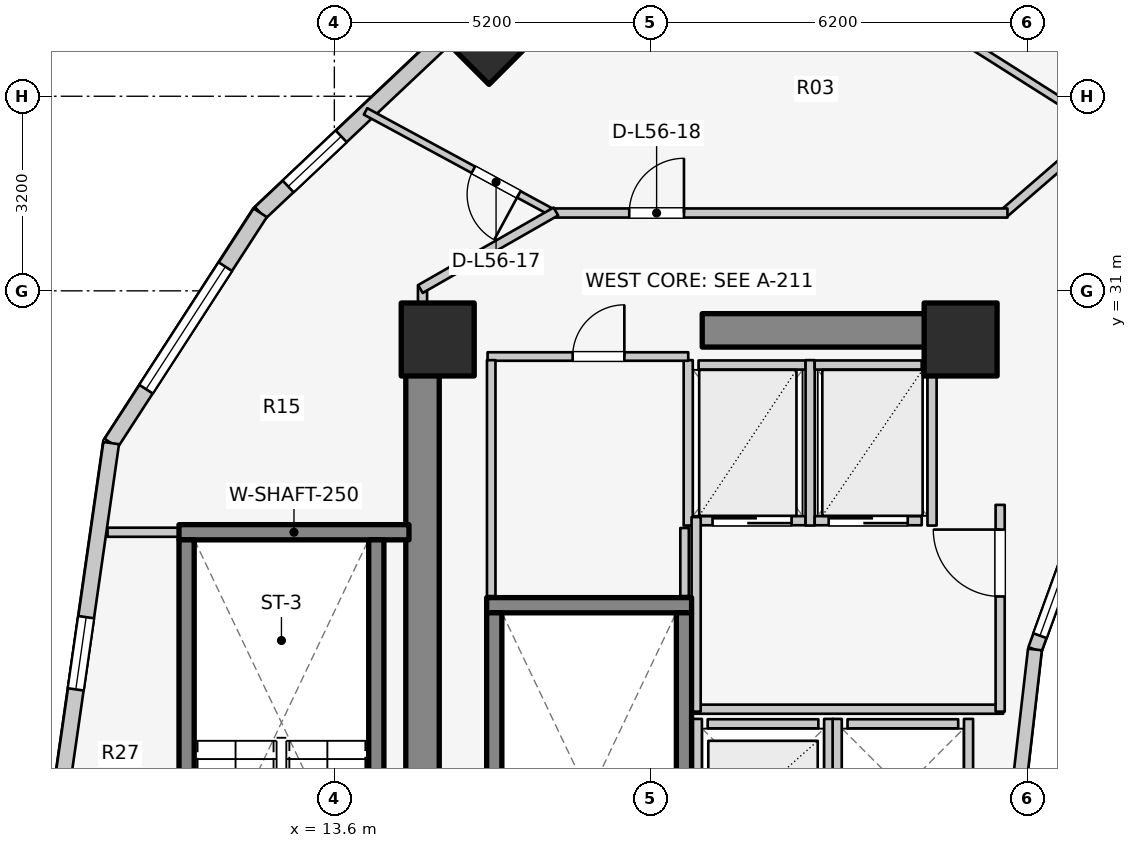
"""IFC4 building model, lengths in metres.
Left out: names, types, materials, properties, quantities, classifications, styles, units other than length and angle.
Written with IfcOpenShell. Run it as: python <this file> out.ifc"""

import sys

from ifc_helpers import new_model, si_unit, direction, frame, frame_2d, origin, origin_2d, place, context, subcontext, project, spatial, rectangle, extrude, element, fill, save


model = new_model("IFC4")
c1 = context("Model", 3, precision=1e-05, world=origin(), true_north=direction((0.0, 1.0)))
c2 = subcontext(c1, "Body", "Model", "MODEL_VIEW")
j1 = project(units=[si_unit("LENGTHUNIT", "METRE"), si_unit("PLANEANGLEUNIT", "RADIAN")], contexts=[c1])
p1 = place(None, origin())
s1 = spatial("IfcSite", under=j1, at=p1, CompositionType="ELEMENT")
p2 = place(p1, origin())
s2 = spatial("IfcBuilding", under=s1, at=p2, CompositionType="ELEMENT")
p3 = place(p2, frame((0.0, 0.0, 183.9)))
s3 = spatial("IfcBuildingStorey", under=s2, at=p3, CompositionType="ELEMENT", Elevation=183.9)
p4 = place(p3, frame((15.05, 17.05, 0.0), z_axis=(0.0, 0.0, 1.0), x_axis=(0.0, 1.0, 0.0)))
e1 = element("IfcWall", 1, at=p4, inside=s3, PredefinedType="SHEAR", context=c2, shape_type="SweptSolid", body=[
    extrude(rectangle(XDim=12.8, YDim=0.55, at=frame_2d((6.4, 0.0))), origin(), (0.0, 0.0, 1.0), 3.1),
])
p5 = place(p3, frame((19.65, 30.35, 0.0), z_axis=(0.0, 0.0, 1.0), x_axis=(1.0, 0.0, 0.0)))
e2 = element("IfcWall", 2, at=p5, inside=s3, PredefinedType="SHEAR", context=c2, shape_type="SweptSolid", body=[
    extrude(rectangle(XDim=4.5, YDim=0.55, at=frame_2d((2.25, 0.0))), origin(), (0.0, 0.0, 1.0), 3.1),
])
p6 = place(p3, frame((16.105, 25.83, 0.0), z_axis=(0.0, 0.0, 1.0), x_axis=(1.0, 0.0, 0.0)))
e3 = element("IfcWall", 3, at=p6, inside=s3, PredefinedType="SOLIDWALL", context=c2, shape_type="SweptSolid", body=[
    extrude(rectangle(XDim=3.37, YDim=0.25, at=frame_2d((1.685, 0.0))), origin(), (0.0, 0.0, 1.0), 3.1),
])
for number, where, z_axis, x_axis in (
    (4, (16.23, 17.895, 0.0), (0.0, 0.0, 1.0), (0.0, 1.0, 0.0)),
    (5, (19.35, 17.895, 0.0), (0.0, 0.0, 1.0), (0.0, 1.0, 0.0)),
):
    element("IfcWall", number, at=place(p3, frame(where, z_axis=z_axis, x_axis=x_axis)), inside=s3, PredefinedType="SOLIDWALL", context=c2, shape_type="SweptSolid", body=[
        extrude(rectangle(XDim=7.81, YDim=0.25, at=frame_2d((3.905, 0.0))), origin(), (0.0, 0.0, 1.0), 3.1),
    ])
p7 = place(p3, frame((11.045, 27.03, 0.0), z_axis=(0.0, 0.0, 1.0), x_axis=(1.0, 0.0, 0.0)))
e6 = element("IfcWall", 6, at=p7, inside=s3, PredefinedType="SOLIDWALL", context=c2, shape_type="SweptSolid", body=[
    extrude(rectangle(XDim=3.782, YDim=0.25, at=frame_2d((1.891, 0.0))), origin(), (0.0, 0.0, 1.0), 3.1),
])
for number, where, z_axis, x_axis in (
    (7, (11.17, 19.095, 0.0), (0.0, 0.0, 1.0), (0.0, 1.0, 0.0)),
    (8, (14.29, 19.095, 0.0), (0.0, 0.0, 1.0), (0.0, 1.0, 0.0)),
):
    element("IfcWall", number, at=place(p3, frame(where, z_axis=z_axis, x_axis=x_axis)), inside=s3, PredefinedType="SOLIDWALL", context=c2, shape_type="SweptSolid", body=[
        extrude(rectangle(XDim=7.81, YDim=0.25, at=frame_2d((3.905, 0.0))), origin(), (0.0, 0.0, 1.0), 3.1),
    ])
for number, where, z_axis, x_axis in (
    (9, (23.9, 30.2, 0.0), (0.0, 0.0, 1.0), (1.0, 0.0, 0.0)),
    (10, (15.3, 30.2, 0.0), (0.0, 0.0, 1.0), (1.0, 0.0, 0.0)),
):
    element("IfcColumn", number, at=place(p3, frame(where, z_axis=z_axis, x_axis=x_axis)), inside=s3, PredefinedType="COLUMN", context=c2, shape_type="SweptSolid", body=[
        extrude(rectangle(XDim=1.2, YDim=1.2, at=origin_2d()), origin(), (0.0, 0.0, 1.0), 3.1),
    ])
p8 = place(p3, frame((16.143, 35.031, 0.0), z_axis=(0.0, 0.0, 1.0), x_axis=(-0.707106781187, 0.707106781187, 0.0)))
e11 = element("IfcColumn", 11, at=p8, inside=s3, PredefinedType="COLUMN", context=c2, shape_type="SweptSolid", body=[
    extrude(rectangle(XDim=0.9, YDim=0.9, at=origin_2d()), origin(), (0.0, 0.0, 1.0), 3.1),
])
p9 = place(p3, frame((25.834, 27.06, 0.0), z_axis=(0.0, 0.0, 1.0), x_axis=(-0.341423187295, -0.93990968033, 0.0)))
e12 = element("IfcWall", 12, at=p9, inside=s3, PredefinedType="STANDARD", context=c2, shape_type="SweptSolid", body=[
    extrude(rectangle(XDim=2.084, YDim=0.23, at=frame_2d((1.042, 0.0))), origin(), (0.0, 0.0, 1.0), 2.84),
])
p10 = place(p9, frame((0.242, 0.0, 0.85)))
e13 = element("IfcOpeningElement", 13, at=p10, cuts=e12, PredefinedType="OPENING", context=c2, shape_type="SweptSolid", body=[
    extrude(rectangle(XDim=1.6, YDim=1.65, at=frame_2d((0.8, 0.825))), frame((0.0, 0.125, 0.0), z_axis=(0.0, -1.0, 0.0), x_axis=(1.0, 0.0, 0.0)), (0.0, 0.0, 1.0), 0.25),
])
p11 = place(p3, frame((25.123, 25.102, 0.0), z_axis=(0.0, 0.0, 1.0), x_axis=(-0.114711713601, -0.993398823617, 0.0)))
e14 = element("IfcWall", 14, at=p11, inside=s3, PredefinedType="STANDARD", context=c2, shape_type="SweptSolid", body=[
    extrude(rectangle(XDim=2.115, YDim=0.23, at=frame_2d((1.058, 0.0))), origin(), (0.0, 0.0, 1.0), 2.84),
])
p12 = place(p3, frame((15.731, 35.441, 0.0), z_axis=(0.0, 0.0, 1.0), x_axis=(-0.727667301037, -0.68593024354, 0.0)))
e15 = element("IfcWall", 15, at=p12, inside=s3, PredefinedType="STANDARD", context=c2, shape_type="SweptSolid", body=[
    extrude(rectangle(XDim=4.604, YDim=0.26, at=frame_2d((2.302, 0.0))), origin(), (0.0, 0.0, 1.0), 2.85),
])
p13 = place(p12, frame((2.772, 0.0, 0.75)))
e16 = element("IfcOpeningElement", 16, at=p13, cuts=e15, PredefinedType="OPENING", context=c2, shape_type="SweptSolid", body=[
    extrude(rectangle(XDim=1.2, YDim=1.5, at=frame_2d((0.6, 0.75))), frame((0.0, 0.14, 0.0), z_axis=(0.0, -1.0, 0.0), x_axis=(1.0, 0.0, 0.0)), (0.0, 0.0, 1.0), 0.28),
])
p14 = place(p3, frame((12.381, 32.284, 0.0), z_axis=(0.0, 0.0, 1.0), x_axis=(-0.543358984534, -0.839500454989, 0.0)))
e17 = element("IfcWall", 17, at=p14, inside=s3, PredefinedType="STANDARD", context=c2, shape_type="SweptSolid", body=[
    extrude(rectangle(XDim=4.511, YDim=0.26, at=frame_2d((2.256, 0.0))), origin(), (0.0, 0.0, 1.0), 2.85),
])
p15 = place(p14, frame((1.056, 0.0, 0.75)))
e18 = element("IfcOpeningElement", 18, at=p15, cuts=e17, PredefinedType="OPENING", context=c2, shape_type="SweptSolid", body=[
    extrude(rectangle(XDim=2.4, YDim=1.7, at=frame_2d((1.2, 0.85))), frame((0.0, 0.14, 0.0), z_axis=(0.0, -1.0, 0.0), x_axis=(1.0, 0.0, 0.0)), (0.0, 0.0, 1.0), 0.28),
])
p16 = place(p3, frame((9.93, 28.497, 0.0), z_axis=(0.0, 0.0, 1.0), x_axis=(-0.142227632286, -0.989833976288, 0.0)))
e19 = element("IfcWall", 19, at=p16, inside=s3, PredefinedType="STANDARD", context=c2, shape_type="SweptSolid", body=[
    extrude(rectangle(XDim=5.553, YDim=0.26, at=frame_2d((2.776, 0.0))), origin(), (0.0, 0.0, 1.0), 2.85),
])
p17 = place(p16, frame((2.892, 0.0, 0.75)))
e20 = element("IfcOpeningElement", 20, at=p17, cuts=e19, PredefinedType="OPENING", context=c2, shape_type="SweptSolid", body=[
    extrude(rectangle(XDim=1.2, YDim=1.5, at=frame_2d((0.6, 0.75))), frame((0.0, 0.14, 0.0), z_axis=(0.0, -1.0, 0.0), x_axis=(1.0, 0.0, 0.0)), (0.0, 0.0, 1.0), 0.28),
])
p18 = place(p3, frame((19.74, 23.88, 0.0), z_axis=(0.0, 0.0, 1.0), x_axis=(1.0, 0.0, 0.0)))
e21 = element("IfcWall", 21, at=p18, inside=s3, PredefinedType="SOLIDWALL", context=c2, shape_type="SweptSolid", body=[
    extrude(rectangle(XDim=1.82, YDim=0.15, at=frame_2d((0.91, 0.0))), origin(), (0.0, 0.0, 1.0), 2.855),
])
for number, where, z_axis, x_axis in (
    (22, (19.57, 21.64, 0.0), (0.0, 0.0, 1.0), (0.0, 1.0, 0.0)),
    (23, (21.73, 21.64, 0.0), (0.0, 0.0, 1.0), (0.0, 1.0, 0.0)),
):
    element("IfcWall", number, at=place(p3, frame(where, z_axis=z_axis, x_axis=x_axis)), inside=s3, PredefinedType="SOLIDWALL", context=c2, shape_type="SweptSolid", body=[
        extrude(rectangle(XDim=2.32, YDim=0.15, at=frame_2d((1.16, 0.0))), origin(), (0.0, 0.0, 1.0), 2.855),
    ])
p19 = place(p3, frame((22.04, 23.88, 0.0), z_axis=(0.0, 0.0, 1.0), x_axis=(1.0, 0.0, 0.0)))
e24 = element("IfcWall", 24, at=p19, inside=s3, PredefinedType="SOLIDWALL", context=c2, shape_type="SweptSolid", body=[
    extrude(rectangle(XDim=1.82, YDim=0.15, at=frame_2d((0.91, 0.0))), origin(), (0.0, 0.0, 1.0), 2.12),
])
p20 = place(p3, frame((21.87, 21.64, 0.0), z_axis=(0.0, 0.0, 1.0), x_axis=(0.0, 1.0, 0.0)))
e25 = element("IfcWall", 25, at=p20, inside=s3, PredefinedType="SOLIDWALL", context=c2, shape_type="SweptSolid", body=[
    extrude(rectangle(XDim=2.32, YDim=0.15, at=frame_2d((1.16, 0.0))), origin(), (0.0, 0.0, 1.0), 2.855),
])
p21 = place(p3, frame((24.03, 21.64, 0.0), z_axis=(0.0, 0.0, 1.0), x_axis=(0.0, 1.0, 0.0)))
e26 = element("IfcWall", 26, at=p21, inside=s3, PredefinedType="SOLIDWALL", context=c2, shape_type="SweptSolid", body=[
    extrude(rectangle(XDim=2.32, YDim=0.15, at=frame_2d((1.16, 0.0))), origin(), (0.0, 0.0, 1.0), 2.12),
])
p22 = place(p3, frame((19.59, 27.22, 0.0), z_axis=(0.0, 0.0, 1.0), x_axis=(1.0, 0.0, 0.0)))
e27 = element("IfcWall", 27, at=p22, inside=s3, PredefinedType="SOLIDWALL", context=c2, shape_type="SweptSolid", body=[
    extrude(rectangle(XDim=1.76, YDim=0.15, at=frame_2d((0.88, 0.0))), origin(), (0.0, 0.0, 1.0), 2.855),
])
p23 = place(p22, frame((0.23, 0.0, 0.0)))
e28 = element("IfcOpeningElement", 28, at=p23, cuts=e27, PredefinedType="OPENING", context=c2, shape_type="SweptSolid", body=[
    extrude(rectangle(XDim=1.3, YDim=2.1, at=frame_2d((0.65, 1.05))), frame((0.0, 0.085, 0.0), z_axis=(0.0, -1.0, 0.0), x_axis=(1.0, 0.0, 0.0)), (0.0, 0.0, 1.0), 0.17),
])
p24 = place(p3, frame((19.59, 29.78, 0.0), z_axis=(0.0, 0.0, 1.0), x_axis=(1.0, 0.0, 0.0)))
e29 = element("IfcWall", 29, at=p24, inside=s3, PredefinedType="SOLIDWALL", context=c2, shape_type="SweptSolid", body=[
    extrude(rectangle(XDim=1.76, YDim=0.15, at=frame_2d((0.88, 0.0))), origin(), (0.0, 0.0, 1.0), 2.855),
])
for number, where, z_axis, x_axis in (
    (30, (19.42, 27.14, 0.0), (0.0, 0.0, 1.0), (0.0, 1.0, 0.0)),
    (31, (21.425, 27.14, 0.0), (0.0, 0.0, 1.0), (0.0, 1.0, 0.0)),
):
    element("IfcWall", number, at=place(p3, frame(where, z_axis=z_axis, x_axis=x_axis)), inside=s3, PredefinedType="SOLIDWALL", context=c2, shape_type="SweptSolid", body=[
        extrude(rectangle(XDim=2.72, YDim=0.15, at=frame_2d((1.36, 0.0))), origin(), (0.0, 0.0, 1.0), 2.855),
    ])
p25 = place(p3, frame((21.5, 27.22, 0.0), z_axis=(0.0, 0.0, 1.0), x_axis=(1.0, 0.0, 0.0)))
e32 = element("IfcWall", 32, at=p25, inside=s3, PredefinedType="SOLIDWALL", context=c2, shape_type="SweptSolid", body=[
    extrude(rectangle(XDim=1.76, YDim=0.15, at=frame_2d((0.88, 0.0))), origin(), (0.0, 0.0, 1.0), 2.855),
])
p26 = place(p25, frame((0.23, 0.0, 0.0)))
e33 = element("IfcOpeningElement", 33, at=p26, cuts=e32, PredefinedType="OPENING", context=c2, shape_type="SweptSolid", body=[
    extrude(rectangle(XDim=1.3, YDim=2.1, at=frame_2d((0.65, 1.05))), frame((0.0, 0.085, 0.0), z_axis=(0.0, -1.0, 0.0), x_axis=(1.0, 0.0, 0.0)), (0.0, 0.0, 1.0), 0.17),
])
p27 = place(p3, frame((21.5, 29.78, 0.0), z_axis=(0.0, 0.0, 1.0), x_axis=(1.0, 0.0, 0.0)))
e34 = element("IfcWall", 34, at=p27, inside=s3, PredefinedType="SOLIDWALL", context=c2, shape_type="SweptSolid", body=[
    extrude(rectangle(XDim=1.76, YDim=0.15, at=frame_2d((0.88, 0.0))), origin(), (0.0, 0.0, 1.0), 2.855),
])
p28 = place(p3, frame((23.43, 27.14, 0.0), z_axis=(0.0, 0.0, 1.0), x_axis=(0.0, 1.0, 0.0)))
e35 = element("IfcWall", 35, at=p28, inside=s3, PredefinedType="SOLIDWALL", context=c2, shape_type="SweptSolid", body=[
    extrude(rectangle(XDim=2.72, YDim=0.15, at=frame_2d((1.36, 0.0))), origin(), (0.0, 0.0, 1.0), 2.855),
])
p29 = place(p3, frame((19.52, 24.12, 0.0), z_axis=(0.0, 0.0, 1.0), x_axis=(1.0, 0.0, 0.0)))
e36 = element("IfcWall", 36, at=p29, inside=s3, PredefinedType="PARTITIONING", context=c2, shape_type="SweptSolid", body=[
    extrude(rectangle(XDim=5.08, YDim=0.15, at=frame_2d((2.54, 0.0))), origin(), (0.0, 0.0, 1.0), 2.12),
])
p30 = place(p3, frame((19.55, 24.08, 0.0), z_axis=(0.0, 0.0, 1.0), x_axis=(0.0, 1.0, 0.0)))
e37 = element("IfcWall", 37, at=p30, inside=s3, PredefinedType="PARTITIONING", context=c2, shape_type="SweptSolid", body=[
    extrude(rectangle(XDim=3.2, YDim=0.15, at=frame_2d((1.6, 0.0))), origin(), (0.0, 0.0, 1.0), 2.855),
])
p31 = place(p3, frame((24.55, 24.08, 0.0), z_axis=(0.0, 0.0, 1.0), x_axis=(0.0, 1.0, 0.0)))
e38 = element("IfcWall", 38, at=p31, inside=s3, PredefinedType="PARTITIONING", context=c2, shape_type="SweptSolid", body=[
    extrude(rectangle(XDim=3.4, YDim=0.15, at=frame_2d((1.7, 0.0))), origin(), (0.0, 0.0, 1.0), 2.855),
])
p32 = place(p31, frame((1.894, 0.0, 0.0)))
e39 = element("IfcOpeningElement", 39, at=p32, cuts=e38, PredefinedType="OPENING", context=c2, shape_type="SweptSolid", body=[
    extrude(rectangle(XDim=1.1, YDim=2.1, at=frame_2d((0.55, 1.05))), frame((0.0, 0.085, 0.0), z_axis=(0.0, -1.0, 0.0), x_axis=(1.0, 0.0, 0.0)), (0.0, 0.0, 1.0), 0.17),
])
p33 = place(p3, frame((16.12, 29.92, 0.0), z_axis=(0.0, 0.0, 1.0), x_axis=(1.0, 0.0, 0.0)))
e40 = element("IfcWall", 40, at=p33, inside=s3, PredefinedType="PLUMBINGWALL", context=c2, shape_type="SweptSolid", body=[
    extrude(rectangle(XDim=3.3, YDim=0.14, at=frame_2d((1.65, 0.0))), origin(), (0.0, 0.0, 1.0), 2.855),
])
p34 = place(p33, frame((1.399, 0.0, 0.0)))
e41 = element("IfcOpeningElement", 41, at=p34, cuts=e40, PredefinedType="OPENING", context=c2, shape_type="SweptSolid", body=[
    extrude(rectangle(XDim=0.85, YDim=2.05, at=frame_2d((0.425, 1.025))), frame((0.0, 0.08, 0.0), z_axis=(0.0, -1.0, 0.0), x_axis=(1.0, 0.0, 0.0)), (0.0, 0.0, 1.0), 0.16),
])
p35 = place(p3, frame((16.18, 25.98, 0.0), z_axis=(0.0, 0.0, 1.0), x_axis=(0.0, 1.0, 0.0)))
e42 = element("IfcWall", 42, at=p35, inside=s3, PredefinedType="PLUMBINGWALL", context=c2, shape_type="SweptSolid", body=[
    extrude(rectangle(XDim=3.88, YDim=0.14, at=frame_2d((1.94, 0.0))), origin(), (0.0, 0.0, 1.0), 2.855),
])
p36 = place(p3, frame((19.36, 25.98, 0.0), z_axis=(0.0, 0.0, 1.0), x_axis=(0.0, 1.0, 0.0)))
e43 = element("IfcWall", 43, at=p36, inside=s3, PredefinedType="PLUMBINGWALL", context=c2, shape_type="SweptSolid", body=[
    extrude(rectangle(XDim=1.12, YDim=0.14, at=frame_2d((0.56, 0.0))), origin(), (0.0, 0.0, 1.0), 2.855),
])
p37 = place(p3, frame((9.87, 27.03, 0.0), z_axis=(0.0, 0.0, 1.0), x_axis=(1.0, 0.0, 0.0)))
e44 = element("IfcWall", 44, at=p37, inside=s3, PredefinedType="PARTITIONING", context=c2, shape_type="SweptSolid", body=[
    extrude(rectangle(XDim=1.17, YDim=0.15, at=frame_2d((0.585, 0.0))), origin(), (0.0, 0.0, 1.0), 2.855),
])
p38 = place(p3, frame((15.05, 29.8, 0.0), z_axis=(0.0, 0.0, 1.0), x_axis=(0.0, 1.0, 0.0)))
e45 = element("IfcWall", 45, at=p38, inside=s3, PredefinedType="PARTITIONING", context=c2, shape_type="SweptSolid", body=[
    extrude(rectangle(XDim=1.29, YDim=0.15, at=frame_2d((0.645, 0.0))), origin(), (0.0, 0.0, 1.0), 2.855),
])
p39 = place(p3, frame((17.244, 32.256, 0.0), z_axis=(0.0, 0.0, 1.0), x_axis=(-0.879385297668, 0.476110804587, 0.0)))
e46 = element("IfcWall", 46, at=p39, inside=s3, PredefinedType="MOVABLE", context=c2, shape_type="SweptSolid", body=[
    extrude(rectangle(XDim=3.56, YDim=0.12, at=frame_2d((1.78, 0.0))), origin(), (0.0, 0.0, 1.0), 2.22),
])
p40 = place(p39, frame((0.694, 0.0, 0.0)))
e47 = element("IfcOpeningElement", 47, at=p40, cuts=e46, PredefinedType="OPENING", context=c2, shape_type="SweptSolid", body=[
    extrude(rectangle(XDim=0.85, YDim=2.05, at=frame_2d((0.425, 1.025))), frame((0.0, 0.07, 0.0), z_axis=(0.0, -1.0, 0.0), x_axis=(1.0, 0.0, 0.0)), (0.0, 0.0, 1.0), 0.14),
])
p41 = place(p3, frame((26.193, 33.642, 0.0), z_axis=(0.0, 0.0, 1.0), x_axis=(-0.756055312247, -0.654507727092, 0.0)))
e48 = element("IfcWall", 48, at=p41, inside=s3, PredefinedType="PARTITIONING", context=c2, shape_type="SweptSolid", body=[
    extrude(rectangle(XDim=2.111, YDim=0.15, at=frame_2d((1.055, 0.0))), origin(), (0.0, 0.0, 1.0), 2.299),
])
p42 = place(p3, frame((17.15, 32.28, 0.0), z_axis=(0.0, 0.0, 1.0), x_axis=(1.0, 0.0, 0.0)))
e49 = element("IfcWall", 49, at=p42, inside=s3, PredefinedType="PARTITIONING", context=c2, shape_type="SweptSolid", body=[
    extrude(rectangle(XDim=7.52, YDim=0.15, at=frame_2d((3.76, 0.0))), origin(), (0.0, 0.0, 1.0), 2.299),
])
p43 = place(p42, frame((1.3, 0.0, 0.0)))
e50 = element("IfcOpeningElement", 50, at=p43, cuts=e49, PredefinedType="OPENING", context=c2, shape_type="SweptSolid", body=[
    extrude(rectangle(XDim=0.9, YDim=2.1, at=frame_2d((0.45, 1.05))), frame((0.0, 0.085, 0.0), z_axis=(0.0, -1.0, 0.0), x_axis=(1.0, 0.0, 0.0)), (0.0, 0.0, 1.0), 0.17),
])
p44 = place(p3, frame((17.243, 32.305, 0.0), z_axis=(0.0, 0.0, 1.0), x_axis=(-0.867991349648, -0.496579315857, 0.0)))
e51 = element("IfcWall", 51, at=p44, inside=s3, PredefinedType="PARTITIONING", context=c2, shape_type="SweptSolid", body=[
    extrude(rectangle(XDim=2.567, YDim=0.15, at=frame_2d((1.283, 0.0))), origin(), (0.0, 0.0, 1.0), 2.22),
])
p45 = place(p3, frame((28.98, 34.952, 0.0), z_axis=(0.0, 0.0, 1.0), x_axis=(-0.647173462792, 0.762342776615, 0.0)))
e52 = element("IfcWall", 52, at=p45, inside=s3, PredefinedType="PARTITIONING", context=c2, shape_type="SweptSolid", body=[
    extrude(rectangle(XDim=6.253, YDim=0.125, at=frame_2d((3.127, 0.0))), origin(), (0.0, 0.0, 1.0), 2.299),
])
p46 = place(p3, frame((26.188, 33.708, 0.0), z_axis=(0.0, 0.0, 1.0), x_axis=(-0.844640430122, 0.535334048799, 0.0)))
e53 = element("IfcWall", 53, at=p46, inside=s3, PredefinedType="PARTITIONING", context=c2, shape_type="SweptSolid", body=[
    extrude(rectangle(XDim=7.188, YDim=0.125, at=frame_2d((3.594, 0.0))), origin(), (0.0, 0.0, 1.0), 2.299),
])
p47 = place(p10, origin())
e54 = element("IfcWindow", 54, at=p47, inside=s3, PartitioningType="SINGLE_PANEL", PredefinedType="WINDOW", context=c2, shape_type="SweptSolid", body=[
    extrude(rectangle(XDim=1.6, YDim=1.65, at=frame_2d((0.8, 0.825))), frame((0.0, 0.03, 0.0), z_axis=(0.0, -1.0, 0.0), x_axis=(1.0, 0.0, 0.0)), (0.0, 0.0, 1.0), 0.06),
])
fill(e13, e54)
p48 = place(p13, origin())
e55 = element("IfcWindow", 55, at=p48, inside=s3, PartitioningType="SINGLE_PANEL", PredefinedType="WINDOW", context=c2, shape_type="SweptSolid", body=[
    extrude(rectangle(XDim=1.2, YDim=1.5, at=frame_2d((0.6, 0.75))), frame((0.0, 0.03, 0.0), z_axis=(0.0, -1.0, 0.0), x_axis=(1.0, 0.0, 0.0)), (0.0, 0.0, 1.0), 0.06),
])
fill(e16, e55)
p49 = place(p15, origin())
e56 = element("IfcWindow", 56, at=p49, inside=s3, PartitioningType="SINGLE_PANEL", PredefinedType="WINDOW", context=c2, shape_type="SweptSolid", body=[
    extrude(rectangle(XDim=2.4, YDim=1.7, at=frame_2d((1.2, 0.85))), frame((0.0, 0.03, 0.0), z_axis=(0.0, -1.0, 0.0), x_axis=(1.0, 0.0, 0.0)), (0.0, 0.0, 1.0), 0.06),
])
fill(e18, e56)
p50 = place(p17, origin())
e57 = element("IfcWindow", 57, at=p50, inside=s3, PartitioningType="SINGLE_PANEL", PredefinedType="WINDOW", context=c2, shape_type="SweptSolid", body=[
    extrude(rectangle(XDim=1.2, YDim=1.5, at=frame_2d((0.6, 0.75))), frame((0.0, 0.03, 0.0), z_axis=(0.0, -1.0, 0.0), x_axis=(1.0, 0.0, 0.0)), (0.0, 0.0, 1.0), 0.06),
])
fill(e20, e57)
p51 = place(p23, origin())
e58 = element("IfcDoor", 58, at=p51, inside=s3, OperationType="DOUBLE_DOOR_SLIDING", PredefinedType="DOOR", context=c2, shape_type="SweptSolid", body=[
    extrude(rectangle(XDim=1.3, YDim=2.1, at=frame_2d((0.65, 1.05))), frame((0.0, 0.025, 0.0), z_axis=(0.0, -1.0, 0.0), x_axis=(1.0, 0.0, 0.0)), (0.0, 0.0, 1.0), 0.05),
])
fill(e28, e58)
p52 = place(p26, origin())
e59 = element("IfcDoor", 59, at=p52, inside=s3, OperationType="DOUBLE_DOOR_SLIDING", PredefinedType="DOOR", context=c2, shape_type="SweptSolid", body=[
    extrude(rectangle(XDim=1.3, YDim=2.1, at=frame_2d((0.65, 1.05))), frame((0.0, 0.025, 0.0), z_axis=(0.0, -1.0, 0.0), x_axis=(1.0, 0.0, 0.0)), (0.0, 0.0, 1.0), 0.05),
])
fill(e33, e59)
p53 = place(p32, origin())
e60 = element("IfcDoor", 60, at=p53, inside=s3, OperationType="SINGLE_SWING_RIGHT", PredefinedType="DOOR", context=c2, shape_type="SweptSolid", body=[
    extrude(rectangle(XDim=1.1, YDim=2.1, at=frame_2d((0.55, 1.05))), frame((0.0, 0.025, 0.0), z_axis=(0.0, -1.0, 0.0), x_axis=(1.0, 0.0, 0.0)), (0.0, 0.0, 1.0), 0.05),
])
fill(e39, e60)
p54 = place(p34, origin())
e61 = element("IfcDoor", 61, at=p54, inside=s3, OperationType="SINGLE_SWING_RIGHT", PredefinedType="DOOR", context=c2, shape_type="SweptSolid", body=[
    extrude(rectangle(XDim=0.85, YDim=2.05, at=frame_2d((0.425, 1.025))), frame((0.0, 0.025, 0.0), z_axis=(0.0, -1.0, 0.0), x_axis=(1.0, 0.0, 0.0)), (0.0, 0.0, 1.0), 0.05),
])
fill(e41, e61)
p55 = place(p40, origin())
e62 = element("IfcDoor", 62, at=p55, inside=s3, OperationType="SINGLE_SWING_LEFT", PredefinedType="DOOR", context=c2, shape_type="SweptSolid", body=[
    extrude(rectangle(XDim=0.85, YDim=2.05, at=frame_2d((0.425, 1.025))), frame((0.0, 0.025, 0.0), z_axis=(0.0, -1.0, 0.0), x_axis=(1.0, 0.0, 0.0)), (0.0, 0.0, 1.0), 0.05),
])
fill(e47, e62)
p56 = place(p43, origin())
e63 = element("IfcDoor", 63, at=p56, inside=s3, OperationType="SINGLE_SWING_RIGHT", PredefinedType="DOOR", context=c2, shape_type="SweptSolid", body=[
    extrude(rectangle(XDim=0.9, YDim=2.1, at=frame_2d((0.45, 1.05))), frame((0.0, 0.025, 0.0), z_axis=(0.0, -1.0, 0.0), x_axis=(1.0, 0.0, 0.0)), (0.0, 0.0, 1.0), 0.05),
])
fill(e50, e63)
save(model, sys.argv[1])
